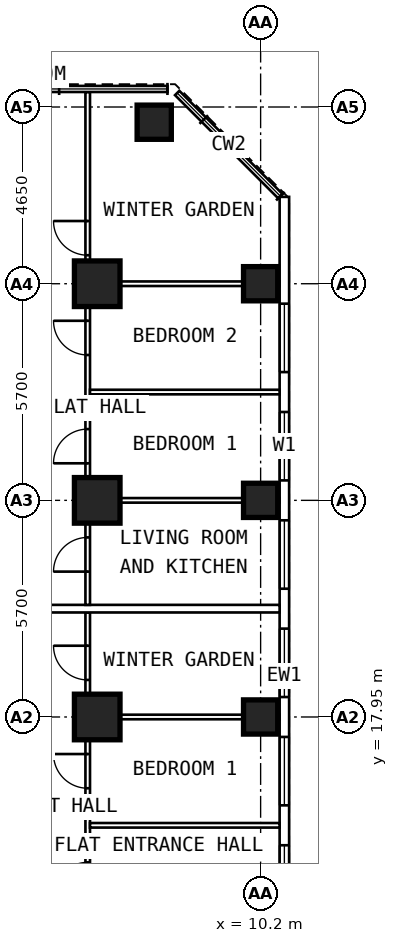
"""IFC4 building model, lengths in metres.
Left out: names, types, materials, properties, quantities, classifications, styles, units other than length and angle.
Written with IfcOpenShell. Run it as: python <this file> out.ifc"""

import sys

from ifc_helpers import new_model, si_unit, direction, frame, frame_2d, origin, origin_2d, place, context, subcontext, project, spatial, rectangle, extrude, element, fill, save


model = new_model("IFC4")
c1 = context("Model", 3, precision=1e-05, world=origin(), true_north=direction((0.0, 1.0)))
c2 = subcontext(c1, "Body", "Model", "MODEL_VIEW")
j1 = project(units=[si_unit("LENGTHUNIT", "METRE"), si_unit("PLANEANGLEUNIT", "RADIAN")], contexts=[c1])
p1 = place(None, origin())
s1 = spatial("IfcSite", under=j1, at=p1, CompositionType="ELEMENT")
p2 = place(p1, origin())
s2 = spatial("IfcBuilding", under=s1, at=p2, CompositionType="ELEMENT")
p3 = place(p2, frame((0.0, 0.0, 84.4)))
s3 = spatial("IfcBuildingStorey", under=s2, at=p3, CompositionType="ELEMENT", Elevation=84.4)
for number, where, z_axis, x_axis in (
    (1, (10.2, 17.95, 0.0), (0.0, 0.0, 1.0), (0.0, 1.0, 0.0)),
    (2, (10.2, 23.65, 0.0), (0.0, 0.0, 1.0), (0.0, 1.0, 0.0)),
    (3, (10.2, 29.35, 0.0), (0.0, 0.0, 1.0), (0.0, 1.0, 0.0)),
    (4, (7.4, 33.6, 0.0), (0.0, 0.0, 1.0), (0.0, 1.0, 0.0)),
):
    element("IfcColumn", number, at=place(p3, frame(where, z_axis=z_axis, x_axis=x_axis)), inside=s3, PredefinedType="COLUMN", context=c2, shape_type="SweptSolid", body=[
        extrude(rectangle(XDim=0.9, YDim=0.9, at=origin_2d()), origin(), (0.0, 0.0, 1.0), 3.6),
    ])
for number, where, z_axis, x_axis in (
    (5, (5.9, 17.95, 0.0), (0.0, 0.0, 1.0), (0.0, 1.0, 0.0)),
    (6, (5.9, 23.65, 0.0), (0.0, 0.0, 1.0), (0.0, 1.0, 0.0)),
    (7, (5.9, 29.35, 0.0), (0.0, 0.0, 1.0), (0.0, 1.0, 0.0)),
):
    element("IfcColumn", number, at=place(p3, frame(where, z_axis=z_axis, x_axis=x_axis)), inside=s3, PredefinedType="COLUMN", context=c2, shape_type="SweptSolid", body=[
        extrude(rectangle(XDim=1.2, YDim=1.2, at=origin_2d()), origin(), (0.0, 0.0, 1.0), 3.6),
    ])
p4 = place(p3, frame((10.825, 6.409, 0.0), z_axis=(0.0, 0.0, 1.0), x_axis=(0.0, 1.0, 0.0)))
e8 = element("IfcWall", 8, at=p4, inside=s3, PredefinedType="SOLIDWALL", context=c2, shape_type="SweptSolid", body=[
    extrude(rectangle(XDim=25.226, YDim=0.25, at=frame_2d((12.613, 0.0))), origin(), (0.0, 0.0, 1.0), 3.35),
])
p5 = place(p4, frame((0.666, 0.0, 0.8)))
e9 = element("IfcOpeningElement", 9, at=p5, cuts=e8, PredefinedType="OPENING", context=c2, shape_type="SweptSolid", body=[
    extrude(rectangle(XDim=1.8, YDim=1.8, at=frame_2d((0.9, 0.9))), frame((0.0, 0.137, 0.0), z_axis=(0.0, -1.0, 0.0), x_axis=(1.0, 0.0, 0.0)), (0.0, 0.0, 1.0), 0.274),
])
p6 = place(p4, frame((3.516, 0.0, 0.8)))
e10 = element("IfcOpeningElement", 10, at=p6, cuts=e8, PredefinedType="OPENING", context=c2, shape_type="SweptSolid", body=[
    extrude(rectangle(XDim=1.8, YDim=1.8, at=frame_2d((0.9, 0.9))), frame((0.0, 0.137, 0.0), z_axis=(0.0, -1.0, 0.0), x_axis=(1.0, 0.0, 0.0)), (0.0, 0.0, 1.0), 0.274),
])
p7 = place(p4, frame((6.366, 0.0, 0.8)))
e11 = element("IfcOpeningElement", 11, at=p7, cuts=e8, PredefinedType="OPENING", context=c2, shape_type="SweptSolid", body=[
    extrude(rectangle(XDim=1.8, YDim=1.8, at=frame_2d((0.9, 0.9))), frame((0.0, 0.137, 0.0), z_axis=(0.0, -1.0, 0.0), x_axis=(1.0, 0.0, 0.0)), (0.0, 0.0, 1.0), 0.274),
])
p8 = place(p4, frame((9.216, 0.0, 0.8)))
e12 = element("IfcOpeningElement", 12, at=p8, cuts=e8, PredefinedType="OPENING", context=c2, shape_type="SweptSolid", body=[
    extrude(rectangle(XDim=1.8, YDim=1.8, at=frame_2d((0.9, 0.9))), frame((0.0, 0.137, 0.0), z_axis=(0.0, -1.0, 0.0), x_axis=(1.0, 0.0, 0.0)), (0.0, 0.0, 1.0), 0.274),
])
p9 = place(p4, frame((12.066, 0.0, 0.8)))
e13 = element("IfcOpeningElement", 13, at=p9, cuts=e8, PredefinedType="OPENING", context=c2, shape_type="SweptSolid", body=[
    extrude(rectangle(XDim=1.8, YDim=1.8, at=frame_2d((0.9, 0.9))), frame((0.0, 0.137, 0.0), z_axis=(0.0, -1.0, 0.0), x_axis=(1.0, 0.0, 0.0)), (0.0, 0.0, 1.0), 0.274),
])
p10 = place(p4, frame((14.916, 0.0, 0.8)))
e14 = element("IfcOpeningElement", 14, at=p10, cuts=e8, PredefinedType="OPENING", context=c2, shape_type="SweptSolid", body=[
    extrude(rectangle(XDim=1.8, YDim=1.8, at=frame_2d((0.9, 0.9))), frame((0.0, 0.137, 0.0), z_axis=(0.0, -1.0, 0.0), x_axis=(1.0, 0.0, 0.0)), (0.0, 0.0, 1.0), 0.274),
])
p11 = place(p4, frame((17.766, 0.0, 0.8)))
e15 = element("IfcOpeningElement", 15, at=p11, cuts=e8, PredefinedType="OPENING", context=c2, shape_type="SweptSolid", body=[
    extrude(rectangle(XDim=1.8, YDim=1.8, at=frame_2d((0.9, 0.9))), frame((0.0, 0.137, 0.0), z_axis=(0.0, -1.0, 0.0), x_axis=(1.0, 0.0, 0.0)), (0.0, 0.0, 1.0), 0.274),
])
p12 = place(p4, frame((20.616, 0.0, 0.8)))
e16 = element("IfcOpeningElement", 16, at=p12, cuts=e8, PredefinedType="OPENING", context=c2, shape_type="SweptSolid", body=[
    extrude(rectangle(XDim=1.8, YDim=1.8, at=frame_2d((0.9, 0.9))), frame((0.0, 0.137, 0.0), z_axis=(0.0, -1.0, 0.0), x_axis=(1.0, 0.0, 0.0)), (0.0, 0.0, 1.0), 0.274),
])
p13 = place(p3, frame((5.65, 9.6, 0.0), z_axis=(0.0, 0.0, 1.0), x_axis=(0.0, 1.0, 0.0)))
e17 = element("IfcWall", 17, at=p13, inside=s3, PredefinedType="PARTITIONING", context=c2, shape_type="SweptSolid", body=[
    extrude(rectangle(XDim=11.1, YDim=0.12, at=frame_2d((5.55, 0.0))), origin(), (0.0, 0.0, 1.0), 3.35),
])
p14 = place(p13, frame((1.0, 0.0, 0.0)))
e18 = element("IfcOpeningElement", 18, at=p14, cuts=e17, PredefinedType="OPENING", context=c2, shape_type="SweptSolid", body=[
    extrude(rectangle(XDim=0.9, YDim=2.1, at=frame_2d((0.45, 1.05))), frame((0.0, 0.072, 0.0), z_axis=(0.0, -1.0, 0.0), x_axis=(1.0, 0.0, 0.0)), (0.0, 0.0, 1.0), 0.144),
])
p15 = place(p13, frame((3.625, 0.0, 0.0)))
e19 = element("IfcOpeningElement", 19, at=p15, cuts=e17, PredefinedType="OPENING", context=c2, shape_type="SweptSolid", body=[
    extrude(rectangle(XDim=0.9, YDim=2.1, at=frame_2d((0.45, 1.05))), frame((0.0, 0.072, 0.0), z_axis=(0.0, -1.0, 0.0), x_axis=(1.0, 0.0, 0.0)), (0.0, 0.0, 1.0), 0.144),
])
p16 = place(p13, frame((6.475, 0.0, 0.0)))
e20 = element("IfcOpeningElement", 20, at=p16, cuts=e17, PredefinedType="OPENING", context=c2, shape_type="SweptSolid", body=[
    extrude(rectangle(XDim=0.9, YDim=2.1, at=frame_2d((0.45, 1.05))), frame((0.0, 0.072, 0.0), z_axis=(0.0, -1.0, 0.0), x_axis=(1.0, 0.0, 0.0)), (0.0, 0.0, 1.0), 0.144),
])
p17 = place(p13, frame((9.325, 0.0, 0.0)))
e21 = element("IfcOpeningElement", 21, at=p17, cuts=e17, PredefinedType="OPENING", context=c2, shape_type="SweptSolid", body=[
    extrude(rectangle(XDim=0.9, YDim=2.1, at=frame_2d((0.45, 1.05))), frame((0.0, 0.072, 0.0), z_axis=(0.0, -1.0, 0.0), x_axis=(1.0, 0.0, 0.0)), (0.0, 0.0, 1.0), 0.144),
])
p18 = place(p3, frame((5.71, 15.1, 0.0), z_axis=(0.0, 0.0, 1.0), x_axis=(1.0, 0.0, 0.0)))
e22 = element("IfcWall", 22, at=p18, inside=s3, PredefinedType="PARTITIONING", context=c2, shape_type="SweptSolid", body=[
    extrude(rectangle(XDim=4.99, YDim=0.12, at=frame_2d((2.495, 0.0))), origin(), (0.0, 0.0, 1.0), 3.35),
])
p19 = place(p3, frame((5.71, 17.95, 0.0), z_axis=(0.0, 0.0, 1.0), x_axis=(1.0, 0.0, 0.0)))
e23 = element("IfcWall", 23, at=p19, inside=s3, PredefinedType="PARTITIONING", context=c2, shape_type="SweptSolid", body=[
    extrude(rectangle(XDim=4.99, YDim=0.12, at=frame_2d((2.495, 0.0))), origin(), (0.0, 0.0, 1.0), 2.45),
])
p20 = place(p3, frame((5.65, 20.9, 0.0), z_axis=(0.0, 0.0, 1.0), x_axis=(0.0, 1.0, 0.0)))
e24 = element("IfcWall", 24, at=p20, inside=s3, PredefinedType="PARTITIONING", context=c2, shape_type="SweptSolid", body=[
    extrude(rectangle(XDim=13.495, YDim=0.12, at=frame_2d((6.748, 0.0))), origin(), (0.0, 0.0, 1.0), 3.35),
])
p21 = place(p20, frame((0.875, 0.0, 0.0)))
e25 = element("IfcOpeningElement", 25, at=p21, cuts=e24, PredefinedType="OPENING", context=c2, shape_type="SweptSolid", body=[
    extrude(rectangle(XDim=0.9, YDim=2.1, at=frame_2d((0.45, 1.05))), frame((0.0, 0.072, 0.0), z_axis=(0.0, -1.0, 0.0), x_axis=(1.0, 0.0, 0.0)), (0.0, 0.0, 1.0), 0.144),
])
p22 = place(p20, frame((3.725, 0.0, 0.0)))
e26 = element("IfcOpeningElement", 26, at=p22, cuts=e24, PredefinedType="OPENING", context=c2, shape_type="SweptSolid", body=[
    extrude(rectangle(XDim=0.9, YDim=2.1, at=frame_2d((0.45, 1.05))), frame((0.0, 0.072, 0.0), z_axis=(0.0, -1.0, 0.0), x_axis=(1.0, 0.0, 0.0)), (0.0, 0.0, 1.0), 0.144),
])
p23 = place(p20, frame((6.575, 0.0, 0.0)))
e27 = element("IfcOpeningElement", 27, at=p23, cuts=e24, PredefinedType="OPENING", context=c2, shape_type="SweptSolid", body=[
    extrude(rectangle(XDim=0.9, YDim=2.1, at=frame_2d((0.45, 1.05))), frame((0.0, 0.072, 0.0), z_axis=(0.0, -1.0, 0.0), x_axis=(1.0, 0.0, 0.0)), (0.0, 0.0, 1.0), 0.144),
])
p24 = place(p20, frame((9.2, 0.0, 0.0)))
e28 = element("IfcOpeningElement", 28, at=p24, cuts=e24, PredefinedType="OPENING", context=c2, shape_type="SweptSolid", body=[
    extrude(rectangle(XDim=0.9, YDim=2.1, at=frame_2d((0.45, 1.05))), frame((0.0, 0.072, 0.0), z_axis=(0.0, -1.0, 0.0), x_axis=(1.0, 0.0, 0.0)), (0.0, 0.0, 1.0), 0.144),
])
p25 = place(p3, frame((5.71, 23.65, 0.0), z_axis=(0.0, 0.0, 1.0), x_axis=(1.0, 0.0, 0.0)))
e29 = element("IfcWall", 29, at=p25, inside=s3, PredefinedType="PARTITIONING", context=c2, shape_type="SweptSolid", body=[
    extrude(rectangle(XDim=4.99, YDim=0.12, at=frame_2d((2.495, 0.0))), origin(), (0.0, 0.0, 1.0), 2.45),
])
p26 = place(p3, frame((5.71, 26.5, 0.0), z_axis=(0.0, 0.0, 1.0), x_axis=(1.0, 0.0, 0.0)))
e30 = element("IfcWall", 30, at=p26, inside=s3, PredefinedType="PARTITIONING", context=c2, shape_type="SweptSolid", body=[
    extrude(rectangle(XDim=4.99, YDim=0.12, at=frame_2d((2.495, 0.0))), origin(), (0.0, 0.0, 1.0), 3.35),
])
p27 = place(p3, frame((5.71, 29.35, 0.0), z_axis=(0.0, 0.0, 1.0), x_axis=(1.0, 0.0, 0.0)))
e31 = element("IfcWall", 31, at=p27, inside=s3, PredefinedType="PARTITIONING", context=c2, shape_type="SweptSolid", body=[
    extrude(rectangle(XDim=4.99, YDim=0.12, at=frame_2d((2.495, 0.0))), origin(), (0.0, 0.0, 1.0), 2.45),
])
p28 = place(p3, frame((2.1, 20.8, 0.0), z_axis=(0.0, 0.0, 1.0), x_axis=(1.0, 0.0, 0.0)))
e32 = element("IfcWall", 32, at=p28, inside=s3, PredefinedType="PARTITIONING", context=c2, shape_type="SweptSolid", body=[
    extrude(rectangle(XDim=8.6, YDim=0.2, at=frame_2d((4.3, 0.0))), origin(), (0.0, 0.0, 1.0), 3.35),
])
p29 = place(p7, origin())
e33 = element("IfcWindow", 33, at=p29, inside=s3, PartitioningType="SINGLE_PANEL", PredefinedType="WINDOW", context=c2, shape_type="SweptSolid", body=[
    extrude(rectangle(XDim=1.8, YDim=1.8, at=frame_2d((0.9, 0.9))), frame((0.0, 0.03, 0.0), z_axis=(0.0, -1.0, 0.0), x_axis=(1.0, 0.0, 0.0)), (0.0, 0.0, 1.0), 0.06),
])
fill(e11, e33)
p30 = place(p8, origin())
e34 = element("IfcWindow", 34, at=p30, inside=s3, PartitioningType="SINGLE_PANEL", PredefinedType="WINDOW", context=c2, shape_type="SweptSolid", body=[
    extrude(rectangle(XDim=1.8, YDim=1.8, at=frame_2d((0.9, 0.9))), frame((0.0, 0.03, 0.0), z_axis=(0.0, -1.0, 0.0), x_axis=(1.0, 0.0, 0.0)), (0.0, 0.0, 1.0), 0.06),
])
fill(e12, e34)
p31 = place(p9, origin())
e35 = element("IfcWindow", 35, at=p31, inside=s3, PartitioningType="SINGLE_PANEL", PredefinedType="WINDOW", context=c2, shape_type="SweptSolid", body=[
    extrude(rectangle(XDim=1.8, YDim=1.8, at=frame_2d((0.9, 0.9))), frame((0.0, 0.03, 0.0), z_axis=(0.0, -1.0, 0.0), x_axis=(1.0, 0.0, 0.0)), (0.0, 0.0, 1.0), 0.06),
])
fill(e13, e35)
p32 = place(p10, origin())
e36 = element("IfcWindow", 36, at=p32, inside=s3, PartitioningType="SINGLE_PANEL", PredefinedType="WINDOW", context=c2, shape_type="SweptSolid", body=[
    extrude(rectangle(XDim=1.8, YDim=1.8, at=frame_2d((0.9, 0.9))), frame((0.0, 0.03, 0.0), z_axis=(0.0, -1.0, 0.0), x_axis=(1.0, 0.0, 0.0)), (0.0, 0.0, 1.0), 0.06),
])
fill(e14, e36)
p33 = place(p11, origin())
e37 = element("IfcWindow", 37, at=p33, inside=s3, PartitioningType="SINGLE_PANEL", PredefinedType="WINDOW", context=c2, shape_type="SweptSolid", body=[
    extrude(rectangle(XDim=1.8, YDim=1.8, at=frame_2d((0.9, 0.9))), frame((0.0, 0.03, 0.0), z_axis=(0.0, -1.0, 0.0), x_axis=(1.0, 0.0, 0.0)), (0.0, 0.0, 1.0), 0.06),
])
fill(e15, e37)
p34 = place(p12, origin())
e38 = element("IfcWindow", 38, at=p34, inside=s3, PartitioningType="SINGLE_PANEL", PredefinedType="WINDOW", context=c2, shape_type="SweptSolid", body=[
    extrude(rectangle(XDim=1.8, YDim=1.8, at=frame_2d((0.9, 0.9))), frame((0.0, 0.03, 0.0), z_axis=(0.0, -1.0, 0.0), x_axis=(1.0, 0.0, 0.0)), (0.0, 0.0, 1.0), 0.06),
])
fill(e16, e38)
p35 = place(p15, origin())
e39 = element("IfcDoor", 39, at=p35, inside=s3, OperationType="SINGLE_SWING_LEFT", PredefinedType="DOOR", context=c2, shape_type="SweptSolid", body=[
    extrude(rectangle(XDim=0.9, YDim=2.1, at=frame_2d((0.45, 1.05))), frame((0.0, 0.025, 0.0), z_axis=(0.0, -1.0, 0.0), x_axis=(1.0, 0.0, 0.0)), (0.0, 0.0, 1.0), 0.05),
])
fill(e19, e39)
p36 = place(p16, origin())
e40 = element("IfcDoor", 40, at=p36, inside=s3, OperationType="SINGLE_SWING_RIGHT", PredefinedType="DOOR", context=c2, shape_type="SweptSolid", body=[
    extrude(rectangle(XDim=0.9, YDim=2.1, at=frame_2d((0.45, 1.05))), frame((0.0, 0.025, 0.0), z_axis=(0.0, -1.0, 0.0), x_axis=(1.0, 0.0, 0.0)), (0.0, 0.0, 1.0), 0.05),
])
fill(e20, e40)
p37 = place(p17, origin())
e41 = element("IfcDoor", 41, at=p37, inside=s3, OperationType="SINGLE_SWING_RIGHT", PredefinedType="DOOR", context=c2, shape_type="SweptSolid", body=[
    extrude(rectangle(XDim=0.9, YDim=2.1, at=frame_2d((0.45, 1.05))), frame((0.0, 0.025, 0.0), z_axis=(0.0, -1.0, 0.0), x_axis=(1.0, 0.0, 0.0)), (0.0, 0.0, 1.0), 0.05),
])
fill(e21, e41)
p38 = place(p21, origin())
e42 = element("IfcDoor", 42, at=p38, inside=s3, OperationType="SINGLE_SWING_LEFT", PredefinedType="DOOR", context=c2, shape_type="SweptSolid", body=[
    extrude(rectangle(XDim=0.9, YDim=2.1, at=frame_2d((0.45, 1.05))), frame((0.0, 0.025, 0.0), z_axis=(0.0, -1.0, 0.0), x_axis=(1.0, 0.0, 0.0)), (0.0, 0.0, 1.0), 0.05),
])
fill(e25, e42)
p39 = place(p22, origin())
e43 = element("IfcDoor", 43, at=p39, inside=s3, OperationType="SINGLE_SWING_LEFT", PredefinedType="DOOR", context=c2, shape_type="SweptSolid", body=[
    extrude(rectangle(XDim=0.9, YDim=2.1, at=frame_2d((0.45, 1.05))), frame((0.0, 0.025, 0.0), z_axis=(0.0, -1.0, 0.0), x_axis=(1.0, 0.0, 0.0)), (0.0, 0.0, 1.0), 0.05),
])
fill(e26, e43)
p40 = place(p23, origin())
e44 = element("IfcDoor", 44, at=p40, inside=s3, OperationType="SINGLE_SWING_RIGHT", PredefinedType="DOOR", context=c2, shape_type="SweptSolid", body=[
    extrude(rectangle(XDim=0.9, YDim=2.1, at=frame_2d((0.45, 1.05))), frame((0.0, 0.025, 0.0), z_axis=(0.0, -1.0, 0.0), x_axis=(1.0, 0.0, 0.0)), (0.0, 0.0, 1.0), 0.05),
])
fill(e27, e44)
p41 = place(p24, origin())
e45 = element("IfcDoor", 45, at=p41, inside=s3, OperationType="SINGLE_SWING_RIGHT", PredefinedType="DOOR", context=c2, shape_type="SweptSolid", body=[
    extrude(rectangle(XDim=0.9, YDim=2.1, at=frame_2d((0.45, 1.05))), frame((0.0, 0.025, 0.0), z_axis=(0.0, -1.0, 0.0), x_axis=(1.0, 0.0, 0.0)), (0.0, 0.0, 1.0), 0.05),
])
fill(e28, e45)
save(model, sys.argv[1])
